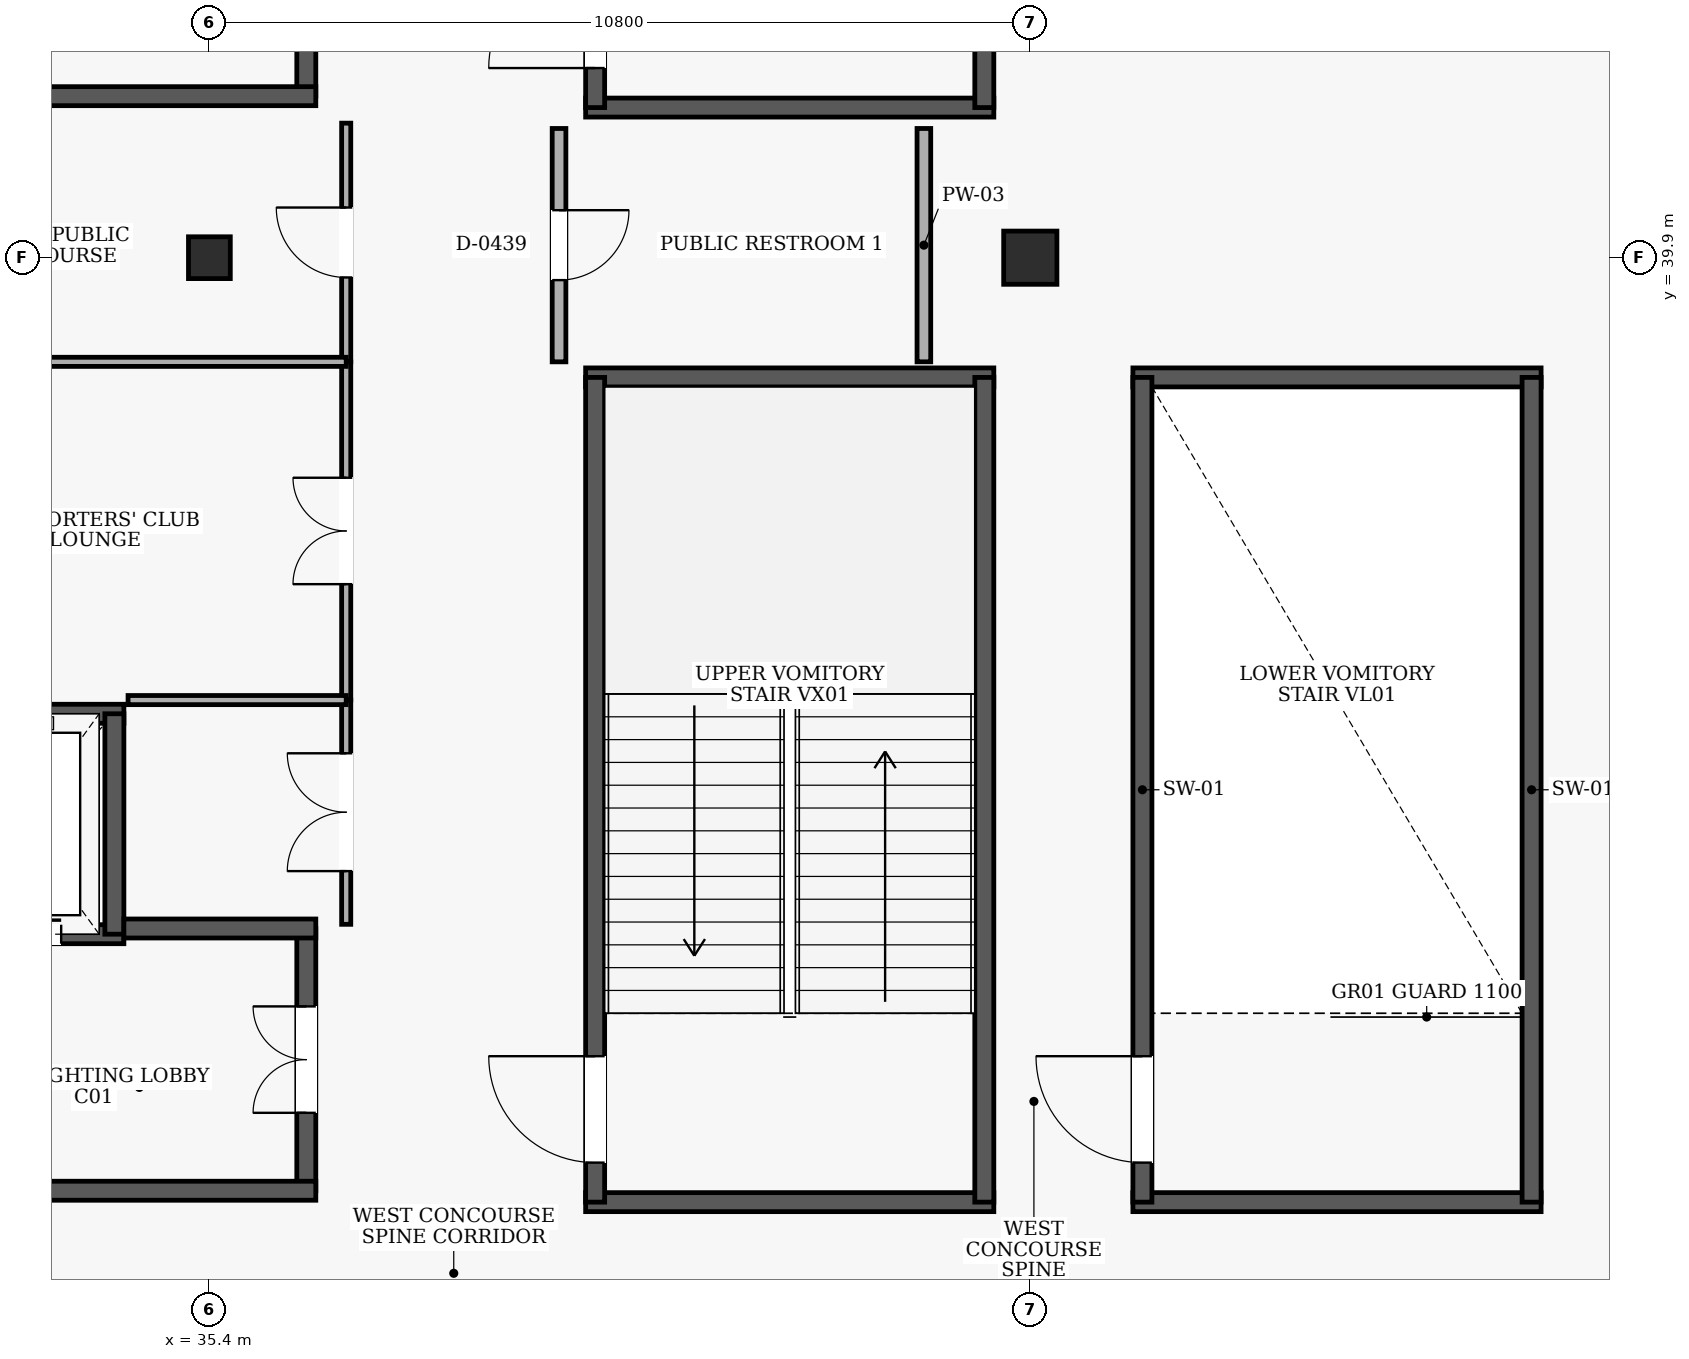
"""IFC4 building model, lengths in metres.
Left out: names, types, materials, properties, quantities, classifications, styles, units other than length and angle.
Written with IfcOpenShell. Run it as: python <this file> out.ifc"""

import sys

from ifc_helpers import new_model, si_unit, direction, frame, frame_2d, origin, origin_2d, place, context, subcontext, project, spatial, rectangle, extrude, element, fill, save


model = new_model("IFC4")
c1 = context("Model", 3, precision=1e-05, world=origin(), true_north=direction((0.0, 1.0)))
c2 = subcontext(c1, "Body", "Model", "MODEL_VIEW")
j1 = project(units=[si_unit("LENGTHUNIT", "METRE"), si_unit("PLANEANGLEUNIT", "RADIAN")], contexts=[c1])
p1 = place(None, origin())
s1 = spatial("IfcSite", under=j1, at=p1, CompositionType="ELEMENT")
p2 = place(p1, origin())
s2 = spatial("IfcBuilding", under=s1, at=p2, CompositionType="ELEMENT")
p3 = place(p2, frame((0.0, 0.0, 5.4)))
s3 = spatial("IfcBuildingStorey", under=s2, at=p3, CompositionType="ELEMENT", Elevation=5.4)
p4 = place(p3, frame((35.4, 39.9, 0.0), z_axis=(0.0, 0.0, 1.0), x_axis=(1.0, 0.0, 0.0)))
e1 = element("IfcColumn", 1, at=p4, inside=s3, PredefinedType="COLUMN", context=c2, shape_type="SweptSolid", body=[
    extrude(rectangle(XDim=0.55, YDim=0.55, at=origin_2d()), origin(), (0.0, 0.0, 1.0), 4.8),
])
p5 = place(p3, frame((46.2, 39.9, 0.0), z_axis=(0.0, 0.0, 1.0), x_axis=(1.0, 0.0, 0.0)))
e2 = element("IfcColumn", 2, at=p5, inside=s3, PredefinedType="COLUMN", context=c2, shape_type="SweptSolid", body=[
    extrude(rectangle(XDim=0.7, YDim=0.7, at=origin_2d()), origin(), (0.0, 0.0, 1.0), 4.8),
])
for number, where, z_axis, x_axis in (
    (3, (40.35, 27.475, 0.0), (0.0, 0.0, 1.0), (1.0, 0.0, 0.0)),
    (4, (45.72, 38.325, 0.0), (0.0, 0.0, 1.0), (-1.0, 0.0, 0.0)),
):
    element("IfcWall", number, at=place(p3, frame(where, z_axis=z_axis, x_axis=x_axis)), inside=s3, PredefinedType="SHEAR", context=c2, shape_type="SweptSolid", body=[
        extrude(rectangle(XDim=5.37, YDim=0.25, at=frame_2d((2.685, 0.0))), origin(), (0.0, 0.0, 1.0), 4.5),
    ])
p6 = place(p3, frame((40.475, 27.475, 0.0), z_axis=(0.0, 0.0, 1.0), x_axis=(0.0, 1.0, 0.0)))
e5 = element("IfcWall", 5, at=p6, inside=s3, PredefinedType="SHEAR", context=c2, shape_type="SweptSolid", body=[
    extrude(rectangle(XDim=10.85, YDim=0.25, at=frame_2d((5.425, 0.0))), origin(), (0.0, 0.0, 1.0), 4.5),
])
p7 = place(p6, frame((0.52, 0.0, 0.0)))
e6 = element("IfcOpeningElement", 6, at=p7, cuts=e5, PredefinedType="OPENING", context=c2, shape_type="SweptSolid", body=[
    extrude(rectangle(XDim=1.4, YDim=2.15, at=frame_2d((0.7, 1.075))), frame((0.0, 0.135, 0.0), z_axis=(0.0, -1.0, 0.0), x_axis=(1.0, 0.0, 0.0)), (0.0, 0.0, 1.0), 0.27),
])
p8 = place(p3, frame((45.595, 27.475, 0.0), z_axis=(0.0, 0.0, 1.0), x_axis=(0.0, 1.0, 0.0)))
e7 = element("IfcWall", 7, at=p8, inside=s3, PredefinedType="SHEAR", context=c2, shape_type="SweptSolid", body=[
    extrude(rectangle(XDim=10.85, YDim=0.25, at=frame_2d((5.425, 0.0))), origin(), (0.0, 0.0, 1.0), 4.5),
])
p9 = place(p3, frame((40.35, 41.875, 0.0), z_axis=(0.0, 0.0, 1.0), x_axis=(1.0, 0.0, 0.0)))
e8 = element("IfcWall", 8, at=p9, inside=s3, PredefinedType="SHEAR", context=c2, shape_type="SweptSolid", body=[
    extrude(rectangle(XDim=5.37, YDim=0.25, at=frame_2d((2.685, 0.0))), origin(), (0.0, 0.0, 1.0), 4.5),
])
p10 = place(p3, frame((40.475, 41.875, 0.0), z_axis=(0.0, 0.0, 1.0), x_axis=(0.0, 1.0, 0.0)))
e9 = element("IfcWall", 9, at=p10, inside=s3, PredefinedType="SHEAR", context=c2, shape_type="SweptSolid", body=[
    extrude(rectangle(XDim=10.85, YDim=0.25, at=frame_2d((5.425, 0.0))), origin(), (0.0, 0.0, 1.0), 4.5),
])
p11 = place(p10, frame((0.52, 0.0, 0.0)))
e10 = element("IfcOpeningElement", 10, at=p11, cuts=e9, PredefinedType="OPENING", context=c2, shape_type="SweptSolid", body=[
    extrude(rectangle(XDim=1.4, YDim=2.15, at=frame_2d((0.7, 1.075))), frame((0.0, 0.135, 0.0), z_axis=(0.0, -1.0, 0.0), x_axis=(1.0, 0.0, 0.0)), (0.0, 0.0, 1.0), 0.27),
])
p12 = place(p3, frame((45.595, 41.875, 0.0), z_axis=(0.0, 0.0, 1.0), x_axis=(0.0, 1.0, 0.0)))
e11 = element("IfcWall", 11, at=p12, inside=s3, PredefinedType="SHEAR", context=c2, shape_type="SweptSolid", body=[
    extrude(rectangle(XDim=10.85, YDim=0.25, at=frame_2d((5.425, 0.0))), origin(), (0.0, 0.0, 1.0), 4.5),
])
for number, where, z_axis, x_axis in (
    (12, (47.55, 27.475, 0.0), (0.0, 0.0, 1.0), (1.0, 0.0, 0.0)),
    (13, (52.92, 38.325, 0.0), (0.0, 0.0, 1.0), (-1.0, 0.0, 0.0)),
):
    element("IfcWall", number, at=place(p3, frame(where, z_axis=z_axis, x_axis=x_axis)), inside=s3, PredefinedType="SHEAR", context=c2, shape_type="SweptSolid", body=[
        extrude(rectangle(XDim=5.37, YDim=0.25, at=frame_2d((2.685, 0.0))), origin(), (0.0, 0.0, 1.0), 4.5),
    ])
p13 = place(p3, frame((47.675, 27.475, 0.0), z_axis=(0.0, 0.0, 1.0), x_axis=(0.0, 1.0, 0.0)))
e14 = element("IfcWall", 14, at=p13, inside=s3, PredefinedType="SHEAR", context=c2, shape_type="SweptSolid", body=[
    extrude(rectangle(XDim=10.85, YDim=0.25, at=frame_2d((5.425, 0.0))), origin(), (0.0, 0.0, 1.0), 4.5),
])
p14 = place(p13, frame((0.52, 0.0, 0.0)))
e15 = element("IfcOpeningElement", 15, at=p14, cuts=e14, PredefinedType="OPENING", context=c2, shape_type="SweptSolid", body=[
    extrude(rectangle(XDim=1.4, YDim=2.15, at=frame_2d((0.7, 1.075))), frame((0.0, 0.135, 0.0), z_axis=(0.0, -1.0, 0.0), x_axis=(1.0, 0.0, 0.0)), (0.0, 0.0, 1.0), 0.27),
])
p15 = place(p3, frame((52.795, 27.475, 0.0), z_axis=(0.0, 0.0, 1.0), x_axis=(0.0, 1.0, 0.0)))
e16 = element("IfcWall", 16, at=p15, inside=s3, PredefinedType="SHEAR", context=c2, shape_type="SweptSolid", body=[
    extrude(rectangle(XDim=10.85, YDim=0.25, at=frame_2d((5.425, 0.0))), origin(), (0.0, 0.0, 1.0), 4.5),
])
p16 = place(p3, frame((31.525, 31.0, 0.0), z_axis=(0.0, 0.0, 1.0), x_axis=(1.0, 0.0, 0.0)))
e17 = element("IfcWall", 17, at=p16, inside=s3, PredefinedType="SHEAR", context=c2, shape_type="SweptSolid", body=[
    extrude(rectangle(XDim=2.75, YDim=0.25, at=frame_2d((1.375, 0.0))), origin(), (0.0, 0.0, 1.0), 4.5),
])
p17 = place(p16, frame((0.825, 0.0, 0.0)))
e18 = element("IfcOpeningElement", 18, at=p17, cuts=e17, PredefinedType="OPENING", context=c2, shape_type="SweptSolid", body=[
    extrude(rectangle(XDim=1.1, YDim=2.15, at=frame_2d((0.55, 1.075))), frame((0.0, 0.135, 0.0), z_axis=(0.0, -1.0, 0.0), x_axis=(1.0, 0.0, 0.0)), (0.0, 0.0, 1.0), 0.27),
])
p18 = place(p3, frame((34.275, 33.9, 0.0), z_axis=(0.0, 0.0, 1.0), x_axis=(-1.0, 0.0, 0.0)))
e19 = element("IfcWall", 19, at=p18, inside=s3, PredefinedType="SHEAR", context=c2, shape_type="SweptSolid", body=[
    extrude(rectangle(XDim=2.75, YDim=0.25, at=frame_2d((1.375, 0.0))), origin(), (0.0, 0.0, 1.0), 4.5),
])
p19 = place(p3, frame((34.15, 31.0, 0.0), z_axis=(0.0, 0.0, 1.0), x_axis=(0.0, 1.0, 0.0)))
e20 = element("IfcWall", 20, at=p19, inside=s3, PredefinedType="SHEAR", context=c2, shape_type="SweptSolid", body=[
    extrude(rectangle(XDim=2.9, YDim=0.25, at=frame_2d((1.45, 0.0))), origin(), (0.0, 0.0, 1.0), 4.5),
])
p20 = place(p3, frame((36.675, 27.625, 0.0), z_axis=(0.0, 0.0, 1.0), x_axis=(0.0, 1.0, 0.0)))
e21 = element("IfcWall", 21, at=p20, inside=s3, PredefinedType="SHEAR", context=c2, shape_type="SweptSolid", body=[
    extrude(rectangle(XDim=3.45, YDim=0.25, at=frame_2d((1.725, 0.0))), origin(), (0.0, 0.0, 1.0), 4.5),
])
p21 = place(p20, frame((1.025, 0.0, 0.0)))
e22 = element("IfcOpeningElement", 22, at=p21, cuts=e21, PredefinedType="OPENING", context=c2, shape_type="SweptSolid", body=[
    extrude(rectangle(XDim=1.4, YDim=2.15, at=frame_2d((0.7, 1.075))), frame((0.0, 0.135, 0.0), z_axis=(0.0, -1.0, 0.0), x_axis=(1.0, 0.0, 0.0)), (0.0, 0.0, 1.0), 0.27),
])
p22 = place(p3, frame((34.275, 31.075, 0.0), z_axis=(0.0, 0.0, 1.0), x_axis=(1.0, 0.0, 0.0)))
e23 = element("IfcWall", 23, at=p22, inside=s3, PredefinedType="SHEAR", context=c2, shape_type="SweptSolid", body=[
    extrude(rectangle(XDim=2.525, YDim=0.25, at=frame_2d((1.263, 0.0))), origin(), (0.0, 0.0, 1.0), 4.5),
])
p23 = place(p3, frame((31.2, 27.625, 0.0), z_axis=(0.0, 0.0, 1.0), x_axis=(1.0, 0.0, 0.0)))
e24 = element("IfcWall", 24, at=p23, inside=s3, PredefinedType="SHEAR", context=c2, shape_type="SweptSolid", body=[
    extrude(rectangle(XDim=5.6, YDim=0.25, at=frame_2d((2.8, 0.0))), origin(), (0.0, 0.0, 1.0), 4.5),
])
p24 = place(p3, frame((36.675, 42.025, 0.0), z_axis=(0.0, 0.0, 1.0), x_axis=(0.0, 1.0, 0.0)))
e25 = element("IfcWall", 25, at=p24, inside=s3, PredefinedType="SHEAR", context=c2, shape_type="SweptSolid", body=[
    extrude(rectangle(XDim=3.45, YDim=0.25, at=frame_2d((1.725, 0.0))), origin(), (0.0, 0.0, 1.0), 4.5),
])
p25 = place(p24, frame((1.025, 0.0, 0.0)))
e26 = element("IfcOpeningElement", 26, at=p25, cuts=e25, PredefinedType="OPENING", context=c2, shape_type="SweptSolid", body=[
    extrude(rectangle(XDim=1.4, YDim=2.15, at=frame_2d((0.7, 1.075))), frame((0.0, 0.135, 0.0), z_axis=(0.0, -1.0, 0.0), x_axis=(1.0, 0.0, 0.0)), (0.0, 0.0, 1.0), 0.27),
])
p26 = place(p3, frame((31.2, 42.025, 0.0), z_axis=(0.0, 0.0, 1.0), x_axis=(1.0, 0.0, 0.0)))
e27 = element("IfcWall", 27, at=p26, inside=s3, PredefinedType="SHEAR", context=c2, shape_type="SweptSolid", body=[
    extrude(rectangle(XDim=5.6, YDim=0.25, at=frame_2d((2.8, 0.0))), origin(), (0.0, 0.0, 1.0), 4.5),
])
p27 = place(p3, frame((44.8, 38.53, 0.0), z_axis=(0.0, 0.0, 1.0), x_axis=(0.0, 1.0, 0.0)))
e28 = element("IfcWall", 28, at=p27, inside=s3, PredefinedType="PARTITIONING", context=c2, shape_type="SweptSolid", body=[
    extrude(rectangle(XDim=3.07, YDim=0.18, at=frame_2d((1.535, 0.0))), origin(), (0.0, 0.0, 1.0), 4.5),
])
p28 = place(p3, frame((40.0, 41.6, 0.0), z_axis=(0.0, 0.0, 1.0), x_axis=(0.0, -1.0, 0.0)))
e29 = element("IfcWall", 29, at=p28, inside=s3, PredefinedType="PARTITIONING", context=c2, shape_type="SweptSolid", body=[
    extrude(rectangle(XDim=3.07, YDim=0.18, at=frame_2d((1.535, 0.0))), origin(), (0.0, 0.0, 1.0), 4.5),
])
p29 = place(p28, frame((1.075, 0.0, 0.0)))
e30 = element("IfcOpeningElement", 30, at=p29, cuts=e29, PredefinedType="OPENING", context=c2, shape_type="SweptSolid", body=[
    extrude(rectangle(XDim=0.92, YDim=2.1, at=frame_2d((0.46, 1.05))), frame((0.0, 0.1, 0.0), z_axis=(0.0, -1.0, 0.0), x_axis=(1.0, 0.0, 0.0)), (0.0, 0.0, 1.0), 0.2),
])
p30 = place(p3, frame((37.2, 38.53, 0.0), z_axis=(0.0, 0.0, 1.0), x_axis=(0.0, 1.0, 0.0)))
e31 = element("IfcWall", 31, at=p30, inside=s3, PredefinedType="PARTITIONING", context=c2, shape_type="SweptSolid", body=[
    extrude(rectangle(XDim=3.14, YDim=0.12, at=frame_2d((1.57, 0.0))), origin(), (0.0, 0.0, 1.0), 4.5),
])
p31 = place(p30, frame((1.11, 0.0, 0.0)))
e32 = element("IfcOpeningElement", 32, at=p31, cuts=e31, PredefinedType="OPENING", context=c2, shape_type="SweptSolid", body=[
    extrude(rectangle(XDim=0.92, YDim=2.1, at=frame_2d((0.46, 1.05))), frame((0.0, 0.07, 0.0), z_axis=(0.0, -1.0, 0.0), x_axis=(1.0, 0.0, 0.0)), (0.0, 0.0, 1.0), 0.14),
])
p32 = place(p3, frame((37.2, 34.08, 0.0), z_axis=(0.0, 0.0, 1.0), x_axis=(0.0, 1.0, 0.0)))
e33 = element("IfcWall", 33, at=p32, inside=s3, PredefinedType="PARTITIONING", context=c2, shape_type="SweptSolid", body=[
    extrude(rectangle(XDim=4.45, YDim=0.12, at=frame_2d((2.225, 0.0))), origin(), (0.0, 0.0, 1.0), 4.5),
])
p33 = place(p32, frame((1.525, 0.0, 0.0)))
e34 = element("IfcOpeningElement", 34, at=p33, cuts=e33, PredefinedType="OPENING", context=c2, shape_type="SweptSolid", body=[
    extrude(rectangle(XDim=1.4, YDim=2.2, at=frame_2d((0.7, 1.1))), frame((0.0, 0.07, 0.0), z_axis=(0.0, -1.0, 0.0), x_axis=(1.0, 0.0, 0.0)), (0.0, 0.0, 1.0), 0.14),
])
p34 = place(p3, frame((37.2, 38.53, 0.0), z_axis=(0.0, 0.0, 1.0), x_axis=(-1.0, 0.0, 0.0)))
e35 = element("IfcWall", 35, at=p34, inside=s3, PredefinedType="PARTITIONING", context=c2, shape_type="SweptSolid", body=[
    extrude(rectangle(XDim=5.8, YDim=0.12, at=frame_2d((2.9, 0.0))), origin(), (0.0, 0.0, 1.0), 4.5),
])
p35 = place(p3, frame((37.2, 31.13, 0.0), z_axis=(0.0, 0.0, 1.0), x_axis=(0.0, 1.0, 0.0)))
e36 = element("IfcWall", 36, at=p35, inside=s3, PredefinedType="PARTITIONING", context=c2, shape_type="SweptSolid", body=[
    extrude(rectangle(XDim=2.95, YDim=0.12, at=frame_2d((1.475, 0.0))), origin(), (0.0, 0.0, 1.0), 4.5),
])
p36 = place(p35, frame((0.7, 0.0, 0.0)))
e37 = element("IfcOpeningElement", 37, at=p36, cuts=e36, PredefinedType="OPENING", context=c2, shape_type="SweptSolid", body=[
    extrude(rectangle(XDim=1.55, YDim=2.2, at=frame_2d((0.775, 1.1))), frame((0.0, 0.07, 0.0), z_axis=(0.0, -1.0, 0.0), x_axis=(1.0, 0.0, 0.0)), (0.0, 0.0, 1.0), 0.14),
])
p37 = place(p3, frame((37.2, 34.08, 0.0), z_axis=(0.0, 0.0, 1.0), x_axis=(-1.0, 0.0, 0.0)))
e38 = element("IfcWall", 38, at=p37, inside=s3, PredefinedType="PARTITIONING", context=c2, shape_type="SweptSolid", body=[
    extrude(rectangle(XDim=2.87, YDim=0.12, at=frame_2d((1.435, 0.0))), origin(), (0.0, 0.0, 1.0), 4.5),
])
p38 = place(p7, frame((1.4, 0.0, 0.0), z_axis=(0.0, 0.0, 1.0), x_axis=(-1.0, 0.0, 0.0)))
e39 = element("IfcDoor", 39, at=p38, inside=s3, OperationType="SINGLE_SWING_LEFT", PredefinedType="DOOR", context=c2, shape_type="SweptSolid", body=[
    extrude(rectangle(XDim=1.4, YDim=2.15, at=frame_2d((0.7, 1.075))), frame((0.0, 0.025, 0.0), z_axis=(0.0, -1.0, 0.0), x_axis=(1.0, 0.0, 0.0)), (0.0, 0.0, 1.0), 0.05),
])
fill(e6, e39)
p39 = place(p11, frame((1.4, 0.0, 0.0), z_axis=(0.0, 0.0, 1.0), x_axis=(-1.0, 0.0, 0.0)))
e40 = element("IfcDoor", 40, at=p39, inside=s3, OperationType="SINGLE_SWING_RIGHT", PredefinedType="DOOR", context=c2, shape_type="SweptSolid", body=[
    extrude(rectangle(XDim=1.4, YDim=2.15, at=frame_2d((0.7, 1.075))), frame((0.0, 0.025, 0.0), z_axis=(0.0, -1.0, 0.0), x_axis=(1.0, 0.0, 0.0)), (0.0, 0.0, 1.0), 0.05),
])
fill(e10, e40)
p40 = place(p14, frame((1.4, 0.0, 0.0), z_axis=(0.0, 0.0, 1.0), x_axis=(-1.0, 0.0, 0.0)))
e41 = element("IfcDoor", 41, at=p40, inside=s3, OperationType="SINGLE_SWING_LEFT", PredefinedType="DOOR", context=c2, shape_type="SweptSolid", body=[
    extrude(rectangle(XDim=1.4, YDim=2.15, at=frame_2d((0.7, 1.075))), frame((0.0, 0.025, 0.0), z_axis=(0.0, -1.0, 0.0), x_axis=(1.0, 0.0, 0.0)), (0.0, 0.0, 1.0), 0.05),
])
fill(e15, e41)
p41 = place(p17, origin())
e42 = element("IfcDoor", 42, at=p41, inside=s3, OperationType="SLIDING_TO_RIGHT", PredefinedType="DOOR", context=c2, shape_type="SweptSolid", body=[
    extrude(rectangle(XDim=1.1, YDim=2.15, at=frame_2d((0.55, 1.075))), frame((0.0, 0.025, 0.0), z_axis=(0.0, -1.0, 0.0), x_axis=(1.0, 0.0, 0.0)), (0.0, 0.0, 1.0), 0.05),
])
fill(e18, e42)
p42 = place(p21, origin())
e43 = element("IfcDoor", 43, at=p42, inside=s3, OperationType="DOUBLE_DOOR_SINGLE_SWING", PredefinedType="DOOR", context=c2, shape_type="SweptSolid", body=[
    extrude(rectangle(XDim=1.4, YDim=2.15, at=frame_2d((0.7, 1.075))), frame((0.0, 0.025, 0.0), z_axis=(0.0, -1.0, 0.0), x_axis=(1.0, 0.0, 0.0)), (0.0, 0.0, 1.0), 0.05),
])
fill(e22, e43)
p43 = place(p29, origin())
e44 = element("IfcDoor", 44, at=p43, inside=s3, OperationType="SINGLE_SWING_LEFT", PredefinedType="DOOR", context=c2, shape_type="SweptSolid", body=[
    extrude(rectangle(XDim=0.92, YDim=2.1, at=frame_2d((0.46, 1.05))), frame((0.0, 0.025, 0.0), z_axis=(0.0, -1.0, 0.0), x_axis=(1.0, 0.0, 0.0)), (0.0, 0.0, 1.0), 0.05),
])
fill(e30, e44)
p44 = place(p31, origin())
e45 = element("IfcDoor", 45, at=p44, inside=s3, OperationType="SINGLE_SWING_RIGHT", PredefinedType="DOOR", context=c2, shape_type="SweptSolid", body=[
    extrude(rectangle(XDim=0.92, YDim=2.1, at=frame_2d((0.46, 1.05))), frame((0.0, 0.025, 0.0), z_axis=(0.0, -1.0, 0.0), x_axis=(1.0, 0.0, 0.0)), (0.0, 0.0, 1.0), 0.05),
])
fill(e32, e45)
p45 = place(p33, origin())
e46 = element("IfcDoor", 46, at=p45, inside=s3, OperationType="DOUBLE_DOOR_SINGLE_SWING", PredefinedType="DOOR", context=c2, shape_type="SweptSolid", body=[
    extrude(rectangle(XDim=1.4, YDim=2.2, at=frame_2d((0.7, 1.1))), frame((0.0, 0.025, 0.0), z_axis=(0.0, -1.0, 0.0), x_axis=(1.0, 0.0, 0.0)), (0.0, 0.0, 1.0), 0.05),
])
fill(e34, e46)
p46 = place(p36, origin())
e47 = element("IfcDoor", 47, at=p46, inside=s3, OperationType="DOUBLE_DOOR_SINGLE_SWING", PredefinedType="DOOR", context=c2, shape_type="SweptSolid", body=[
    extrude(rectangle(XDim=1.55, YDim=2.2, at=frame_2d((0.775, 1.1))), frame((0.0, 0.025, 0.0), z_axis=(0.0, -1.0, 0.0), x_axis=(1.0, 0.0, 0.0)), (0.0, 0.0, 1.0), 0.05),
])
fill(e37, e47)
save(model, sys.argv[1])
